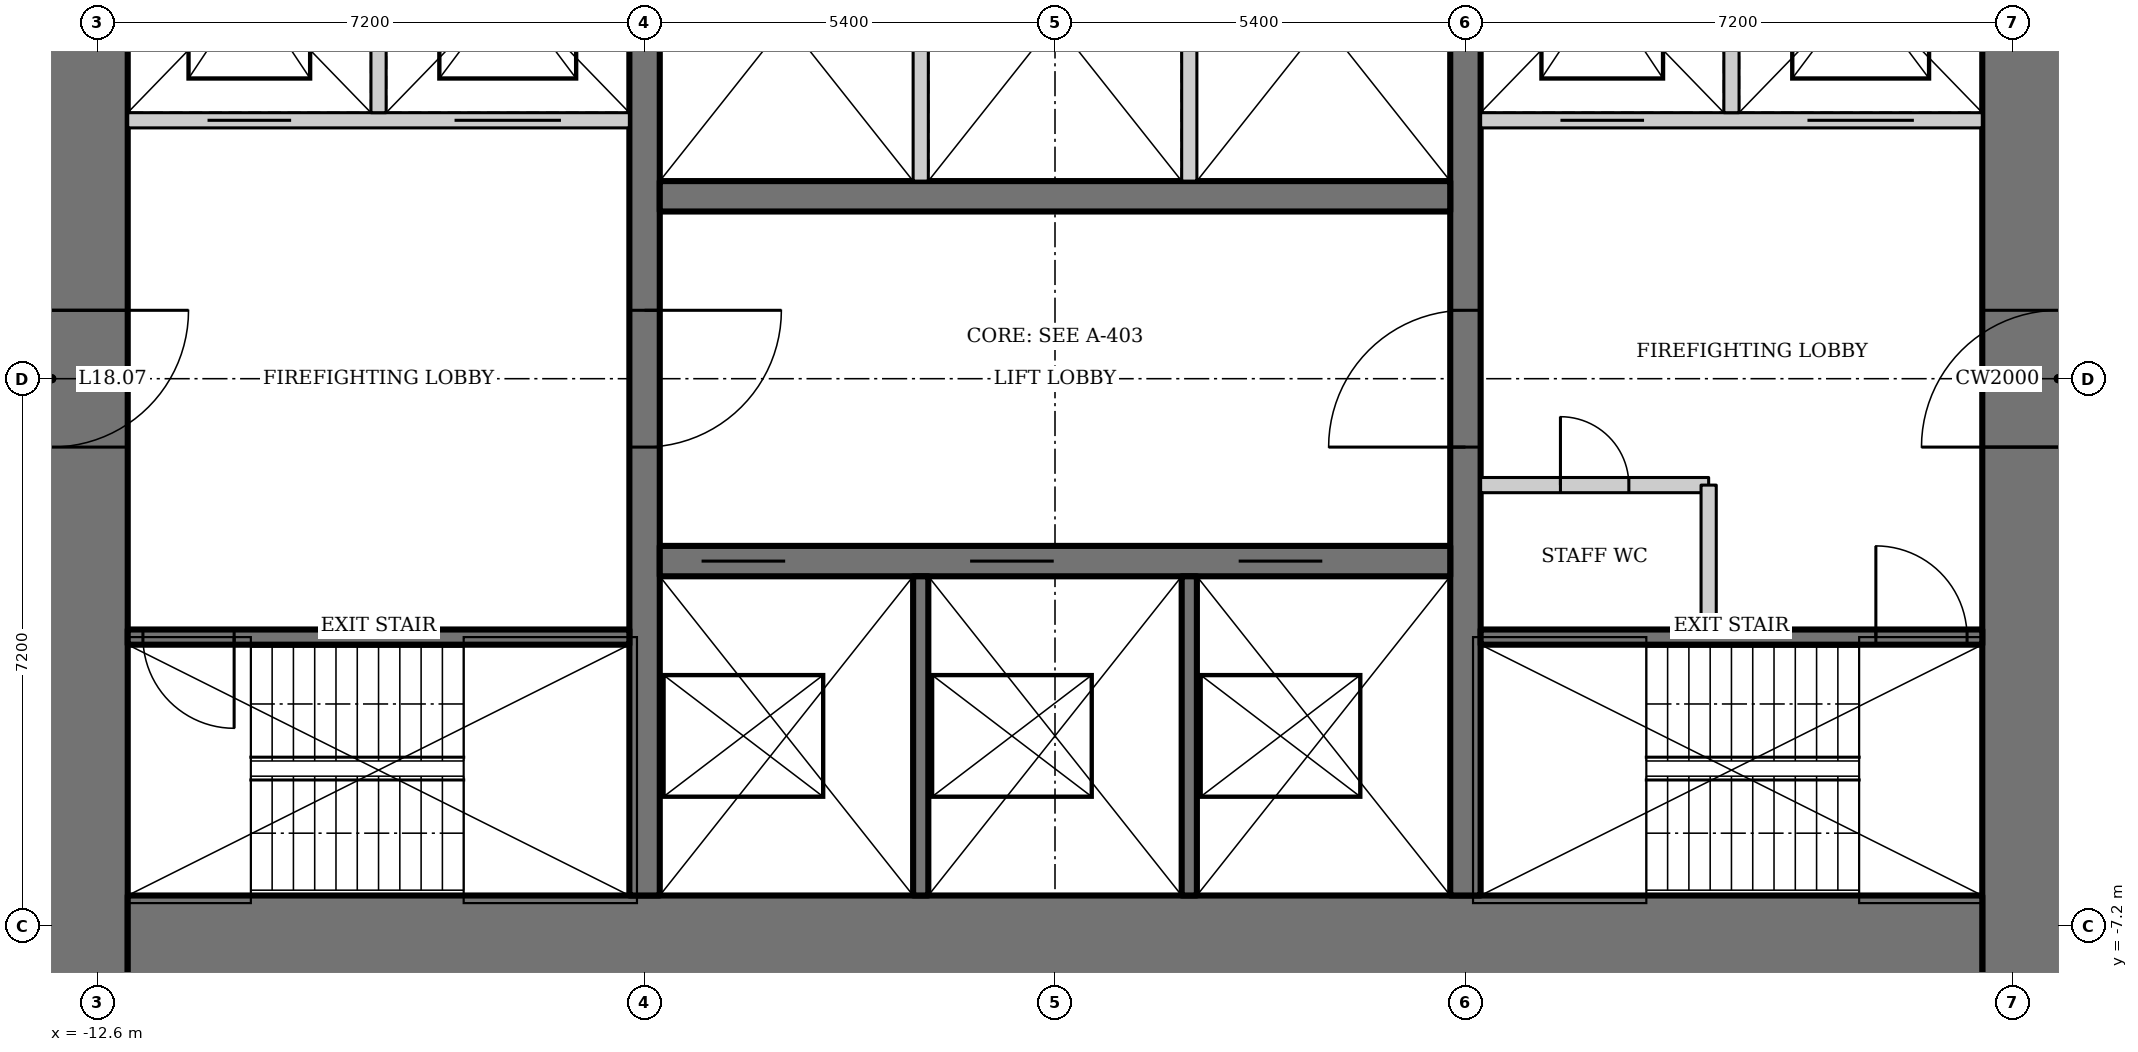
"""IFC4 building model, lengths in metres.
Left out: names, types, materials, properties, quantities, classifications, styles, units other than length and angle.
Written with IfcOpenShell. Run it as: python <this file> out.ifc"""

import sys

from ifc_helpers import new_model, si_unit, direction, frame, frame_2d, origin, place, context, subcontext, project, spatial, rectangle, extrude, element, fill, save


model = new_model("IFC4")
c1 = context("Model", 3, precision=1e-05, world=origin(), true_north=direction((0.0, 1.0)))
c2 = subcontext(c1, "Body", "Model", "MODEL_VIEW")
j1 = project(units=[si_unit("LENGTHUNIT", "METRE"), si_unit("PLANEANGLEUNIT", "RADIAN")], contexts=[c1])
p1 = place(None, origin())
s1 = spatial("IfcSite", under=j1, at=p1, CompositionType="ELEMENT")
p2 = place(p1, origin())
s2 = spatial("IfcBuilding", under=s1, at=p2, CompositionType="ELEMENT")
p3 = place(p2, frame((0.0, 0.0, 80.2)))
s3 = spatial("IfcBuildingStorey", under=s2, at=p3, CompositionType="ELEMENT", Elevation=80.2)
p4 = place(p3, frame((13.2, -13.0, 0.0), z_axis=(0.0, 0.0, 1.0), x_axis=(0.0, 1.0, 0.0)))
e1 = element("IfcWall", 1, at=p4, inside=s3, PredefinedType="SHEAR", context=c2, shape_type="SweptSolid", body=[
    extrude(rectangle(XDim=26.0, YDim=2.0, at=frame_2d((13.0, 0.0))), origin(), (0.0, 0.0, 1.0), 3.6),
])
p5 = place(p4, frame((12.1, 0.0, 0.0)))
e2 = element("IfcOpeningElement", 2, at=p5, cuts=e1, PredefinedType="OPENING", context=c2, shape_type="SweptSolid", body=[
    extrude(rectangle(XDim=1.8, YDim=2.1, at=frame_2d((0.9, 1.05))), frame((0.0, 1.01, 0.0), z_axis=(0.0, -1.0, 0.0), x_axis=(1.0, 0.0, 0.0)), (0.0, 0.0, 1.0), 2.02),
])
p6 = place(p3, frame((-13.2, 13.0, 0.0), z_axis=(0.0, 0.0, 1.0), x_axis=(0.0, -1.0, 0.0)))
e3 = element("IfcWall", 3, at=p6, inside=s3, PredefinedType="SHEAR", context=c2, shape_type="SweptSolid", body=[
    extrude(rectangle(XDim=26.0, YDim=2.0, at=frame_2d((13.0, 0.0))), origin(), (0.0, 0.0, 1.0), 3.6),
])
p7 = place(p6, frame((12.1, 0.0, 0.0)))
e4 = element("IfcOpeningElement", 4, at=p7, cuts=e3, PredefinedType="OPENING", context=c2, shape_type="SweptSolid", body=[
    extrude(rectangle(XDim=1.8, YDim=2.1, at=frame_2d((0.9, 1.05))), frame((0.0, 1.01, 0.0), z_axis=(0.0, -1.0, 0.0), x_axis=(1.0, 0.0, 0.0)), (0.0, 0.0, 1.0), 2.02),
])
p8 = place(p3, frame((-12.2, -8.0, 0.0), z_axis=(0.0, 0.0, 1.0), x_axis=(1.0, 0.0, 0.0)))
e5 = element("IfcWall", 5, at=p8, inside=s3, PredefinedType="SHEAR", context=c2, shape_type="SweptSolid", body=[
    extrude(rectangle(XDim=24.4, YDim=2.4, at=frame_2d((12.2, 0.0))), origin(), (0.0, 0.0, 1.0), 3.6),
])
p9 = place(p3, frame((5.4, -6.8, 0.0), z_axis=(0.0, 0.0, 1.0), x_axis=(0.0, 1.0, 0.0)))
e6 = element("IfcWall", 6, at=p9, inside=s3, PredefinedType="SHEAR", context=c2, shape_type="SweptSolid", body=[
    extrude(rectangle(XDim=13.6, YDim=0.4, at=frame_2d((6.8, 0.0))), origin(), (0.0, 0.0, 1.0), 3.6),
])
p10 = place(p9, frame((5.9, 0.0, 0.0)))
e7 = element("IfcOpeningElement", 7, at=p10, cuts=e6, PredefinedType="OPENING", context=c2, shape_type="SweptSolid", body=[
    extrude(rectangle(XDim=1.8, YDim=2.1, at=frame_2d((0.9, 1.05))), frame((0.0, 0.21, 0.0), z_axis=(0.0, -1.0, 0.0), x_axis=(1.0, 0.0, 0.0)), (0.0, 0.0, 1.0), 0.42),
])
p11 = place(p3, frame((-5.4, 6.8, 0.0), z_axis=(0.0, 0.0, 1.0), x_axis=(0.0, -1.0, 0.0)))
e8 = element("IfcWall", 8, at=p11, inside=s3, PredefinedType="SHEAR", context=c2, shape_type="SweptSolid", body=[
    extrude(rectangle(XDim=13.6, YDim=0.4, at=frame_2d((6.8, 0.0))), origin(), (0.0, 0.0, 1.0), 3.6),
])
p12 = place(p11, frame((5.9, 0.0, 0.0)))
e9 = element("IfcOpeningElement", 9, at=p12, cuts=e8, PredefinedType="OPENING", context=c2, shape_type="SweptSolid", body=[
    extrude(rectangle(XDim=1.8, YDim=2.1, at=frame_2d((0.9, 1.05))), frame((0.0, 0.21, 0.0), z_axis=(0.0, -1.0, 0.0), x_axis=(1.0, 0.0, 0.0)), (0.0, 0.0, 1.0), 0.42),
])
p13 = place(p3, frame((-5.2, -2.4, 0.0), z_axis=(0.0, 0.0, 1.0), x_axis=(1.0, 0.0, 0.0)))
e10 = element("IfcWall", 10, at=p13, inside=s3, PredefinedType="SHEAR", context=c2, shape_type="SweptSolid", body=[
    extrude(rectangle(XDim=10.4, YDim=0.4, at=frame_2d((5.2, 0.0))), origin(), (0.0, 0.0, 1.0), 3.6),
])
p14 = place(p13, frame((0.55, 0.0, 0.0)))
e11 = element("IfcOpeningElement", 11, at=p14, cuts=e10, PredefinedType="OPENING", context=c2, shape_type="SweptSolid", body=[
    extrude(rectangle(XDim=1.1, YDim=2.2, at=frame_2d((0.55, 1.1))), frame((0.0, 0.21, 0.0), z_axis=(0.0, -1.0, 0.0), x_axis=(1.0, 0.0, 0.0)), (0.0, 0.0, 1.0), 0.42),
])
p15 = place(p13, frame((4.083, 0.0, 0.0)))
e12 = element("IfcOpeningElement", 12, at=p15, cuts=e10, PredefinedType="OPENING", context=c2, shape_type="SweptSolid", body=[
    extrude(rectangle(XDim=1.1, YDim=2.2, at=frame_2d((0.55, 1.1))), frame((0.0, 0.21, 0.0), z_axis=(0.0, -1.0, 0.0), x_axis=(1.0, 0.0, 0.0)), (0.0, 0.0, 1.0), 0.42),
])
p16 = place(p13, frame((7.617, 0.0, 0.0)))
e13 = element("IfcOpeningElement", 13, at=p16, cuts=e10, PredefinedType="OPENING", context=c2, shape_type="SweptSolid", body=[
    extrude(rectangle(XDim=1.1, YDim=2.2, at=frame_2d((0.55, 1.1))), frame((0.0, 0.21, 0.0), z_axis=(0.0, -1.0, 0.0), x_axis=(1.0, 0.0, 0.0)), (0.0, 0.0, 1.0), 0.42),
])
for number, where, z_axis, x_axis in (
    (14, (-1.767, -2.6, 0.0), (0.0, 0.0, 1.0), (0.0, -1.0, 0.0)),
    (15, (1.767, -2.6, 0.0), (0.0, 0.0, 1.0), (0.0, -1.0, 0.0)),
):
    element("IfcWall", number, at=place(p3, frame(where, z_axis=z_axis, x_axis=x_axis)), inside=s3, PredefinedType="SOLIDWALL", context=c2, shape_type="SweptSolid", body=[
        extrude(rectangle(XDim=4.2, YDim=0.2, at=frame_2d((2.1, 0.0))), origin(), (0.0, 0.0, 1.0), 3.6),
    ])
p17 = place(p3, frame((5.2, 2.4, 0.0), z_axis=(0.0, 0.0, 1.0), x_axis=(-1.0, 0.0, 0.0)))
e16 = element("IfcWall", 16, at=p17, inside=s3, PredefinedType="SHEAR", context=c2, shape_type="SweptSolid", body=[
    extrude(rectangle(XDim=10.4, YDim=0.4, at=frame_2d((5.2, 0.0))), origin(), (0.0, 0.0, 1.0), 3.6),
])
for number, where, z_axis, x_axis in (
    (17, (-1.767, 2.6, 0.0), (0.0, 0.0, 1.0), (0.0, 1.0, 0.0)),
    (18, (1.767, 2.6, 0.0), (0.0, 0.0, 1.0), (0.0, 1.0, 0.0)),
):
    element("IfcWall", number, at=place(p3, frame(where, z_axis=z_axis, x_axis=x_axis)), inside=s3, PredefinedType="SOLIDWALL", context=c2, shape_type="SweptSolid", body=[
        extrude(rectangle(XDim=4.2, YDim=0.2, at=frame_2d((2.1, 0.0))), origin(), (0.0, 0.0, 1.0), 3.6),
    ])
p18 = place(p3, frame((5.6, -3.4, 0.0), z_axis=(0.0, 0.0, 1.0), x_axis=(1.0, 0.0, 0.0)))
e19 = element("IfcWall", 19, at=p18, inside=s3, PredefinedType="SHEAR", context=c2, shape_type="SweptSolid", body=[
    extrude(rectangle(XDim=6.6, YDim=0.2, at=frame_2d((3.3, 0.0))), origin(), (0.0, 0.0, 1.0), 3.6),
])
p19 = place(p18, frame((5.2, 0.0, 0.0)))
e20 = element("IfcOpeningElement", 20, at=p19, cuts=e19, PredefinedType="OPENING", context=c2, shape_type="SweptSolid", body=[
    extrude(rectangle(XDim=1.2, YDim=2.1, at=frame_2d((0.6, 1.05))), frame((0.0, 0.11, 0.0), z_axis=(0.0, -1.0, 0.0), x_axis=(1.0, 0.0, 0.0)), (0.0, 0.0, 1.0), 0.22),
])
p20 = place(p3, frame((12.2, 3.4, 0.0), z_axis=(0.0, 0.0, 1.0), x_axis=(-1.0, 0.0, 0.0)))
e21 = element("IfcWall", 21, at=p20, inside=s3, PredefinedType="SOLIDWALL", context=c2, shape_type="SweptSolid", body=[
    extrude(rectangle(XDim=6.6, YDim=0.2, at=frame_2d((3.3, 0.0))), origin(), (0.0, 0.0, 1.0), 3.6),
])
p21 = place(p20, frame((4.45, 0.0, 0.0)))
e22 = element("IfcOpeningElement", 22, at=p21, cuts=e21, PredefinedType="OPENING", context=c2, shape_type="SweptSolid", body=[
    extrude(rectangle(XDim=1.1, YDim=2.2, at=frame_2d((0.55, 1.1))), frame((0.0, 0.11, 0.0), z_axis=(0.0, -1.0, 0.0), x_axis=(1.0, 0.0, 0.0)), (0.0, 0.0, 1.0), 0.22),
])
p22 = place(p20, frame((0.9, 0.0, 0.0)))
e23 = element("IfcOpeningElement", 23, at=p22, cuts=e21, PredefinedType="OPENING", context=c2, shape_type="SweptSolid", body=[
    extrude(rectangle(XDim=1.4, YDim=2.2, at=frame_2d((0.7, 1.1))), frame((0.0, 0.11, 0.0), z_axis=(0.0, -1.0, 0.0), x_axis=(1.0, 0.0, 0.0)), (0.0, 0.0, 1.0), 0.22),
])
p23 = place(p3, frame((8.9, 3.5, 0.0), z_axis=(0.0, 0.0, 1.0), x_axis=(0.0, 1.0, 0.0)))
e24 = element("IfcWall", 24, at=p23, inside=s3, PredefinedType="SOLIDWALL", context=c2, shape_type="SweptSolid", body=[
    extrude(rectangle(XDim=3.3, YDim=0.2, at=frame_2d((1.65, 0.0))), origin(), (0.0, 0.0, 1.0), 3.6),
])
p24 = place(p3, frame((-5.6, -3.4, 0.0), z_axis=(0.0, 0.0, 1.0), x_axis=(-1.0, 0.0, 0.0)))
e25 = element("IfcWall", 25, at=p24, inside=s3, PredefinedType="SHEAR", context=c2, shape_type="SweptSolid", body=[
    extrude(rectangle(XDim=6.6, YDim=0.2, at=frame_2d((3.3, 0.0))), origin(), (0.0, 0.0, 1.0), 3.6),
])
p25 = place(p24, frame((5.2, 0.0, 0.0)))
e26 = element("IfcOpeningElement", 26, at=p25, cuts=e25, PredefinedType="OPENING", context=c2, shape_type="SweptSolid", body=[
    extrude(rectangle(XDim=1.2, YDim=2.1, at=frame_2d((0.6, 1.05))), frame((0.0, 0.11, 0.0), z_axis=(0.0, -1.0, 0.0), x_axis=(1.0, 0.0, 0.0)), (0.0, 0.0, 1.0), 0.22),
])
p26 = place(p3, frame((-12.2, 3.4, 0.0), z_axis=(0.0, 0.0, 1.0), x_axis=(1.0, 0.0, 0.0)))
e27 = element("IfcWall", 27, at=p26, inside=s3, PredefinedType="SOLIDWALL", context=c2, shape_type="SweptSolid", body=[
    extrude(rectangle(XDim=6.6, YDim=0.2, at=frame_2d((3.3, 0.0))), origin(), (0.0, 0.0, 1.0), 3.6),
])
p27 = place(p26, frame((1.05, 0.0, 0.0)))
e28 = element("IfcOpeningElement", 28, at=p27, cuts=e27, PredefinedType="OPENING", context=c2, shape_type="SweptSolid", body=[
    extrude(rectangle(XDim=1.1, YDim=2.2, at=frame_2d((0.55, 1.1))), frame((0.0, 0.11, 0.0), z_axis=(0.0, -1.0, 0.0), x_axis=(1.0, 0.0, 0.0)), (0.0, 0.0, 1.0), 0.22),
])
p28 = place(p26, frame((4.3, 0.0, 0.0)))
e29 = element("IfcOpeningElement", 29, at=p28, cuts=e27, PredefinedType="OPENING", context=c2, shape_type="SweptSolid", body=[
    extrude(rectangle(XDim=1.4, YDim=2.2, at=frame_2d((0.7, 1.1))), frame((0.0, 0.11, 0.0), z_axis=(0.0, -1.0, 0.0), x_axis=(1.0, 0.0, 0.0)), (0.0, 0.0, 1.0), 0.22),
])
p29 = place(p3, frame((-8.9, 3.5, 0.0), z_axis=(0.0, 0.0, 1.0), x_axis=(0.0, 1.0, 0.0)))
e30 = element("IfcWall", 30, at=p29, inside=s3, PredefinedType="SOLIDWALL", context=c2, shape_type="SweptSolid", body=[
    extrude(rectangle(XDim=3.3, YDim=0.2, at=frame_2d((1.65, 0.0))), origin(), (0.0, 0.0, 1.0), 3.6),
])
p30 = place(p3, frame((5.6, -1.4, 0.0), z_axis=(0.0, 0.0, 1.0), x_axis=(1.0, 0.0, 0.0)))
e31 = element("IfcWall", 31, at=p30, inside=s3, PredefinedType="SOLIDWALL", context=c2, shape_type="SweptSolid", body=[
    extrude(rectangle(XDim=3.0, YDim=0.2, at=frame_2d((1.5, 0.0))), origin(), (0.0, 0.0, 1.0), 3.45),
])
p31 = place(p30, frame((1.05, 0.0, 0.0)))
e32 = element("IfcOpeningElement", 32, at=p31, cuts=e31, PredefinedType="OPENING", context=c2, shape_type="SweptSolid", body=[
    extrude(rectangle(XDim=0.9, YDim=2.1, at=frame_2d((0.45, 1.05))), frame((0.0, 0.11, 0.0), z_axis=(0.0, -1.0, 0.0), x_axis=(1.0, 0.0, 0.0)), (0.0, 0.0, 1.0), 0.22),
])
p32 = place(p3, frame((8.6, -1.4, 0.0), z_axis=(0.0, 0.0, 1.0), x_axis=(0.0, -1.0, 0.0)))
e33 = element("IfcWall", 33, at=p32, inside=s3, PredefinedType="SOLIDWALL", context=c2, shape_type="SweptSolid", body=[
    extrude(rectangle(XDim=1.9, YDim=0.2, at=frame_2d((0.95, 0.0))), origin(), (0.0, 0.0, 1.0), 3.45),
])
p33 = place(p31, origin())
e34 = element("IfcDoor", 34, at=p33, inside=s3, OperationType="SINGLE_SWING_LEFT", PredefinedType="DOOR", context=c2, shape_type="SweptSolid", body=[
    extrude(rectangle(XDim=0.9, YDim=2.1, at=frame_2d((0.45, 1.05))), frame((0.0, 0.025, 0.0), z_axis=(0.0, -1.0, 0.0), x_axis=(1.0, 0.0, 0.0)), (0.0, 0.0, 1.0), 0.05),
])
fill(e32, e34)
p34 = place(p10, origin())
e35 = element("IfcDoor", 35, at=p34, inside=s3, OperationType="DOUBLE_DOOR_DOUBLE_SWING", PredefinedType="DOOR", context=c2, shape_type="SweptSolid", body=[
    extrude(rectangle(XDim=1.8, YDim=2.1, at=frame_2d((0.9, 1.05))), frame((0.0, 0.025, 0.0), z_axis=(0.0, -1.0, 0.0), x_axis=(1.0, 0.0, 0.0)), (0.0, 0.0, 1.0), 0.05),
])
fill(e7, e35)
p35 = place(p12, origin())
e36 = element("IfcDoor", 36, at=p35, inside=s3, OperationType="DOUBLE_DOOR_DOUBLE_SWING", PredefinedType="DOOR", context=c2, shape_type="SweptSolid", body=[
    extrude(rectangle(XDim=1.8, YDim=2.1, at=frame_2d((0.9, 1.05))), frame((0.0, 0.025, 0.0), z_axis=(0.0, -1.0, 0.0), x_axis=(1.0, 0.0, 0.0)), (0.0, 0.0, 1.0), 0.05),
])
fill(e9, e36)
p36 = place(p19, origin())
e37 = element("IfcDoor", 37, at=p36, inside=s3, OperationType="SINGLE_SWING_RIGHT", PredefinedType="DOOR", context=c2, shape_type="SweptSolid", body=[
    extrude(rectangle(XDim=1.2, YDim=2.1, at=frame_2d((0.6, 1.05))), frame((0.0, 0.025, 0.0), z_axis=(0.0, -1.0, 0.0), x_axis=(1.0, 0.0, 0.0)), (0.0, 0.0, 1.0), 0.05),
])
fill(e20, e37)
p37 = place(p25, origin())
e38 = element("IfcDoor", 38, at=p37, inside=s3, OperationType="SINGLE_SWING_RIGHT", PredefinedType="DOOR", context=c2, shape_type="SweptSolid", body=[
    extrude(rectangle(XDim=1.2, YDim=2.1, at=frame_2d((0.6, 1.05))), frame((0.0, 0.025, 0.0), z_axis=(0.0, -1.0, 0.0), x_axis=(1.0, 0.0, 0.0)), (0.0, 0.0, 1.0), 0.05),
])
fill(e26, e38)
p38 = place(p5, origin())
e39 = element("IfcDoor", 39, at=p38, inside=s3, OperationType="DOUBLE_DOOR_DOUBLE_SWING", PredefinedType="DOOR", context=c2, shape_type="SweptSolid", body=[
    extrude(rectangle(XDim=1.8, YDim=2.1, at=frame_2d((0.9, 1.05))), frame((0.0, 0.025, 0.0), z_axis=(0.0, -1.0, 0.0), x_axis=(1.0, 0.0, 0.0)), (0.0, 0.0, 1.0), 0.05),
])
fill(e2, e39)
p39 = place(p7, origin())
e40 = element("IfcDoor", 40, at=p39, inside=s3, OperationType="DOUBLE_DOOR_DOUBLE_SWING", PredefinedType="DOOR", context=c2, shape_type="SweptSolid", body=[
    extrude(rectangle(XDim=1.8, YDim=2.1, at=frame_2d((0.9, 1.05))), frame((0.0, 0.025, 0.0), z_axis=(0.0, -1.0, 0.0), x_axis=(1.0, 0.0, 0.0)), (0.0, 0.0, 1.0), 0.05),
])
fill(e4, e40)
p40 = place(p14, origin())
e41 = element("IfcDoor", 41, at=p40, inside=s3, OperationType="DOUBLE_DOOR_SLIDING", PredefinedType="DOOR", context=c2, shape_type="SweptSolid", body=[
    extrude(rectangle(XDim=1.1, YDim=2.2, at=frame_2d((0.55, 1.1))), frame((0.0, 0.025, 0.0), z_axis=(0.0, -1.0, 0.0), x_axis=(1.0, 0.0, 0.0)), (0.0, 0.0, 1.0), 0.05),
])
fill(e11, e41)
p41 = place(p15, origin())
e42 = element("IfcDoor", 42, at=p41, inside=s3, OperationType="DOUBLE_DOOR_SLIDING", PredefinedType="DOOR", context=c2, shape_type="SweptSolid", body=[
    extrude(rectangle(XDim=1.1, YDim=2.2, at=frame_2d((0.55, 1.1))), frame((0.0, 0.025, 0.0), z_axis=(0.0, -1.0, 0.0), x_axis=(1.0, 0.0, 0.0)), (0.0, 0.0, 1.0), 0.05),
])
fill(e12, e42)
p42 = place(p16, origin())
e43 = element("IfcDoor", 43, at=p42, inside=s3, OperationType="DOUBLE_DOOR_SLIDING", PredefinedType="DOOR", context=c2, shape_type="SweptSolid", body=[
    extrude(rectangle(XDim=1.1, YDim=2.2, at=frame_2d((0.55, 1.1))), frame((0.0, 0.025, 0.0), z_axis=(0.0, -1.0, 0.0), x_axis=(1.0, 0.0, 0.0)), (0.0, 0.0, 1.0), 0.05),
])
fill(e13, e43)
p43 = place(p27, origin())
e44 = element("IfcDoor", 44, at=p43, inside=s3, OperationType="DOUBLE_DOOR_SLIDING", PredefinedType="DOOR", context=c2, shape_type="SweptSolid", body=[
    extrude(rectangle(XDim=1.1, YDim=2.2, at=frame_2d((0.55, 1.1))), frame((0.0, 0.025, 0.0), z_axis=(0.0, -1.0, 0.0), x_axis=(1.0, 0.0, 0.0)), (0.0, 0.0, 1.0), 0.05),
])
fill(e28, e44)
p44 = place(p28, origin())
e45 = element("IfcDoor", 45, at=p44, inside=s3, OperationType="DOUBLE_DOOR_SLIDING", PredefinedType="DOOR", context=c2, shape_type="SweptSolid", body=[
    extrude(rectangle(XDim=1.4, YDim=2.2, at=frame_2d((0.7, 1.1))), frame((0.0, 0.025, 0.0), z_axis=(0.0, -1.0, 0.0), x_axis=(1.0, 0.0, 0.0)), (0.0, 0.0, 1.0), 0.05),
])
fill(e29, e45)
p45 = place(p21, origin())
e46 = element("IfcDoor", 46, at=p45, inside=s3, OperationType="DOUBLE_DOOR_SLIDING", PredefinedType="DOOR", context=c2, shape_type="SweptSolid", body=[
    extrude(rectangle(XDim=1.1, YDim=2.2, at=frame_2d((0.55, 1.1))), frame((0.0, 0.025, 0.0), z_axis=(0.0, -1.0, 0.0), x_axis=(1.0, 0.0, 0.0)), (0.0, 0.0, 1.0), 0.05),
])
fill(e22, e46)
p46 = place(p22, origin())
e47 = element("IfcDoor", 47, at=p46, inside=s3, OperationType="DOUBLE_DOOR_SLIDING", PredefinedType="DOOR", context=c2, shape_type="SweptSolid", body=[
    extrude(rectangle(XDim=1.4, YDim=2.2, at=frame_2d((0.7, 1.1))), frame((0.0, 0.025, 0.0), z_axis=(0.0, -1.0, 0.0), x_axis=(1.0, 0.0, 0.0)), (0.0, 0.0, 1.0), 0.05),
])
fill(e23, e47)
save(model, sys.argv[1])
